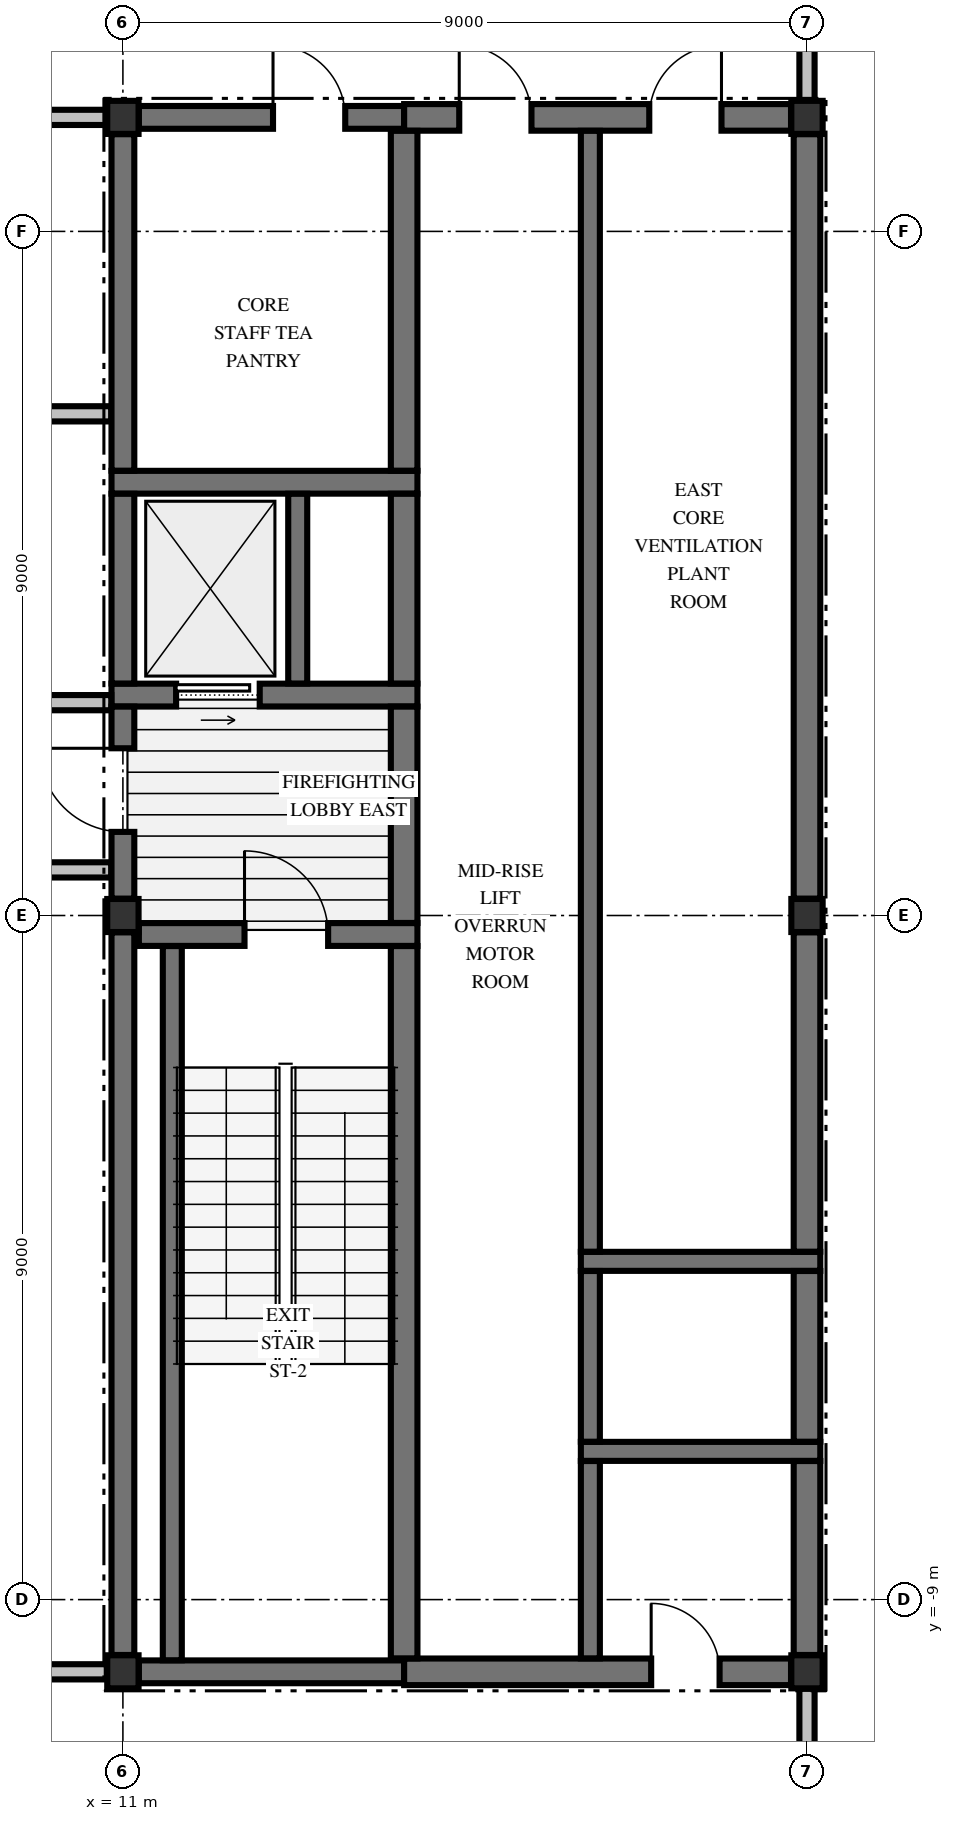
"""IFC4 building model, lengths in metres.
Left out: names, types, materials, properties, quantities, classifications, styles, units other than length and angle.
Written with IfcOpenShell. Run it as: python <this file> out.ifc"""

import sys

from ifc_helpers import new_model, si_unit, direction, frame, frame_2d, origin, origin_2d, place, context, subcontext, project, spatial, rectangle, i_section, extrude, element, fill, save


model = new_model("IFC4")
c1 = context("Model", 3, precision=1e-05, world=origin(), true_north=direction((0.0, 1.0)))
c2 = subcontext(c1, "Body", "Model", "MODEL_VIEW")
j1 = project(units=[si_unit("LENGTHUNIT", "METRE"), si_unit("PLANEANGLEUNIT", "RADIAN")], contexts=[c1])
p1 = place(None, origin())
s1 = spatial("IfcSite", under=j1, at=p1, CompositionType="ELEMENT")
p2 = place(p1, origin())
s2 = spatial("IfcBuilding", under=s1, at=p2, CompositionType="ELEMENT")
p3 = place(p2, frame((0.0, 0.0, 153.48)))
s3 = spatial("IfcBuildingStorey", under=s2, at=p3, CompositionType="ELEMENT", Elevation=153.48)
for number, where, z_axis, x_axis in (
    (1, (11.0, -9.95, -0.425), (0.0, 0.0, 1.0), (1.0, 0.0, 0.0)),
    (2, (11.0, 0.0, -0.425), (0.0, 0.0, 1.0), (1.0, 0.0, 0.0)),
    (3, (11.0, 10.5, -0.425), (0.0, 0.0, 1.0), (1.0, 0.0, 0.0)),
    (4, (20.0, -9.95, -0.425), (0.0, 0.0, 1.0), (1.0, 0.0, 0.0)),
    (5, (20.0, 10.5, -0.425), (0.0, 0.0, 1.0), (1.0, 0.0, 0.0)),
    (6, (20.0, 0.0, -0.425), (0.0, 0.0, 1.0), (1.0, 0.0, 0.0)),
):
    element("IfcColumn", number, at=place(p3, frame(where, z_axis=z_axis, x_axis=x_axis)), inside=s3, PredefinedType="COLUMN", context=c2, shape_type="SweptSolid", body=[
        extrude(i_section(OverallWidth=0.412, OverallDepth=0.435, WebThickness=0.036, FlangeThickness=0.058, FilletRadius=0.015, at=origin_2d()), origin(), (0.0, 0.0, 1.0), 4.76),
    ])
p4 = place(p3, frame((11.21, -9.95, 0.0), z_axis=(0.0, 0.0, 1.0), x_axis=(1.0, 0.0, 0.0)))
e7 = element("IfcWall", 7, at=p4, inside=s3, PredefinedType="SHEAR", context=c2, shape_type="SweptSolid", body=[
    extrude(rectangle(XDim=3.49, YDim=0.3, at=frame_2d((1.745, 0.0))), origin(), (0.0, 0.0, 1.0), 4.335),
])
p5 = place(p3, frame((14.7, -9.95, 0.0), z_axis=(0.0, 0.0, 1.0), x_axis=(1.0, 0.0, 0.0)))
e8 = element("IfcWall", 8, at=p5, inside=s3, PredefinedType="SHEAR", context=c2, shape_type="SweptSolid", body=[
    extrude(rectangle(XDim=5.09, YDim=0.35, at=frame_2d((2.545, 0.0))), origin(), (0.0, 0.0, 1.0), 4.335),
])
p6 = place(p5, frame((3.25, 0.0, 0.0)))
e9 = element("IfcOpeningElement", 9, at=p6, cuts=e8, PredefinedType="OPENING", context=c2, shape_type="SweptSolid", body=[
    extrude(rectangle(XDim=0.9, YDim=2.15, at=frame_2d((0.45, 1.075))), frame((0.0, 0.185, 0.0), z_axis=(0.0, -1.0, 0.0), x_axis=(1.0, 0.0, 0.0)), (0.0, 0.0, 1.0), 0.37),
])
for number, where, z_axis, x_axis in (
    (10, (17.025, -7.05, 0.0), (0.0, 0.0, 1.0), (1.0, 0.0, 0.0)),
    (11, (17.025, -4.55, 0.0), (0.0, 0.0, 1.0), (1.0, 0.0, 0.0)),
):
    element("IfcWall", number, at=place(p3, frame(where, z_axis=z_axis, x_axis=x_axis)), inside=s3, PredefinedType="SOLIDWALL", context=c2, shape_type="SweptSolid", body=[
        extrude(rectangle(XDim=3.15, YDim=0.25, at=frame_2d((1.575, 0.0))), origin(), (0.0, 0.0, 1.0), 4.335),
    ])
p7 = place(p3, frame((11.21, -0.25, 0.0), z_axis=(0.0, 0.0, 1.0), x_axis=(1.0, 0.0, 0.0)))
e12 = element("IfcWall", 12, at=p7, inside=s3, PredefinedType="SHEAR", context=c2, shape_type="SweptSolid", body=[
    extrude(rectangle(XDim=3.665, YDim=0.3, at=frame_2d((1.833, 0.0))), origin(), (0.0, 0.0, 1.0), 4.335),
])
p8 = place(p7, frame((1.39, 0.0, 0.0)))
e13 = element("IfcOpeningElement", 13, at=p8, cuts=e12, PredefinedType="OPENING", context=c2, shape_type="SweptSolid", body=[
    extrude(rectangle(XDim=1.1, YDim=2.15, at=frame_2d((0.55, 1.075))), frame((0.0, 0.16, 0.0), z_axis=(0.0, -1.0, 0.0), x_axis=(1.0, 0.0, 0.0)), (0.0, 0.0, 1.0), 0.32),
])
p9 = place(p3, frame((10.85, 2.9, 0.0), z_axis=(0.0, 0.0, 1.0), x_axis=(1.0, 0.0, 0.0)))
e14 = element("IfcWall", 14, at=p9, inside=s3, PredefinedType="SHEAR", context=c2, shape_type="SweptSolid", body=[
    extrude(rectangle(XDim=4.025, YDim=0.3, at=frame_2d((2.012, 0.0))), origin(), (0.0, 0.0, 1.0), 4.335),
])
p10 = place(p9, frame((0.85, 0.0, 0.0)))
e15 = element("IfcOpeningElement", 15, at=p10, cuts=e14, PredefinedType="OPENING", context=c2, shape_type="SweptSolid", body=[
    extrude(rectangle(XDim=1.1, YDim=2.2, at=frame_2d((0.55, 1.1))), frame((0.0, 0.16, 0.0), z_axis=(0.0, -1.0, 0.0), x_axis=(1.0, 0.0, 0.0)), (0.0, 0.0, 1.0), 0.32),
])
p11 = place(p3, frame((10.85, 5.7, 0.0), z_axis=(0.0, 0.0, 1.0), x_axis=(1.0, 0.0, 0.0)))
e16 = element("IfcWall", 16, at=p11, inside=s3, PredefinedType="SHEAR", context=c2, shape_type="SweptSolid", body=[
    extrude(rectangle(XDim=4.025, YDim=0.3, at=frame_2d((2.012, 0.0))), origin(), (0.0, 0.0, 1.0), 4.335),
])
p12 = place(p3, frame((11.21, 10.5, 0.0), z_axis=(0.0, 0.0, 1.0), x_axis=(1.0, 0.0, 0.0)))
e17 = element("IfcWall", 17, at=p12, inside=s3, PredefinedType="SHEAR", context=c2, shape_type="SweptSolid", body=[
    extrude(rectangle(XDim=3.49, YDim=0.3, at=frame_2d((1.745, 0.0))), origin(), (0.0, 0.0, 1.0), 4.335),
])
p13 = place(p12, frame((1.765, 0.0, 0.0)))
e18 = element("IfcOpeningElement", 18, at=p13, cuts=e17, PredefinedType="OPENING", context=c2, shape_type="SweptSolid", body=[
    extrude(rectangle(XDim=0.95, YDim=2.02, at=frame_2d((0.475, 1.01))), frame((0.0, 0.16, 0.0), z_axis=(0.0, -1.0, 0.0), x_axis=(1.0, 0.0, 0.0)), (0.0, 0.0, 1.0), 0.32),
])
p14 = place(p3, frame((14.7, 10.5, 0.0), z_axis=(0.0, 0.0, 1.0), x_axis=(1.0, 0.0, 0.0)))
e19 = element("IfcWall", 19, at=p14, inside=s3, PredefinedType="SHEAR", context=c2, shape_type="SweptSolid", body=[
    extrude(rectangle(XDim=5.09, YDim=0.35, at=frame_2d((2.545, 0.0))), origin(), (0.0, 0.0, 1.0), 4.335),
])
p15 = place(p14, frame((0.725, 0.0, 0.0)))
e20 = element("IfcOpeningElement", 20, at=p15, cuts=e19, PredefinedType="OPENING", context=c2, shape_type="SweptSolid", body=[
    extrude(rectangle(XDim=0.95, YDim=2.02, at=frame_2d((0.475, 1.01))), frame((0.0, 0.185, 0.0), z_axis=(0.0, -1.0, 0.0), x_axis=(1.0, 0.0, 0.0)), (0.0, 0.0, 1.0), 0.37),
])
p16 = place(p14, frame((3.225, 0.0, 0.0)))
e21 = element("IfcOpeningElement", 21, at=p16, cuts=e19, PredefinedType="OPENING", context=c2, shape_type="SweptSolid", body=[
    extrude(rectangle(XDim=0.95, YDim=2.02, at=frame_2d((0.475, 1.01))), frame((0.0, 0.185, 0.0), z_axis=(0.0, -1.0, 0.0), x_axis=(1.0, 0.0, 0.0)), (0.0, 0.0, 1.0), 0.37),
])
p17 = place(p3, frame((-10.788, -9.95, 0.0), z_axis=(0.0, 0.0, 1.0), x_axis=(1.0, 0.0, 0.0)))
e22 = element("IfcWall", 22, at=p17, inside=s3, PredefinedType="PARTITIONING", context=c2, shape_type="SweptSolid", body=[
    extrude(rectangle(XDim=21.576, YDim=0.2, at=frame_2d((10.788, 0.0))), origin(), (0.0, 0.0, 1.0), 4.335),
])
p18 = place(p17, frame((7.238, 0.0, 0.0)))
e23 = element("IfcOpeningElement", 23, at=p18, cuts=e22, PredefinedType="OPENING", context=c2, shape_type="SweptSolid", body=[
    extrude(rectangle(XDim=1.1, YDim=2.15, at=frame_2d((0.55, 1.075))), frame((0.0, 0.11, 0.0), z_axis=(0.0, -1.0, 0.0), x_axis=(1.0, 0.0, 0.0)), (0.0, 0.0, 1.0), 0.22),
])
p19 = place(p3, frame((-10.847, 0.6, 0.0), z_axis=(0.0, 0.0, 1.0), x_axis=(1.0, 0.0, 0.0)))
e24 = element("IfcWall", 24, at=p19, inside=s3, PredefinedType="PARTITIONING", context=c2, shape_type="SweptSolid", body=[
    extrude(rectangle(XDim=21.694, YDim=0.2, at=frame_2d((10.847, 0.0))), origin(), (0.0, 0.0, 1.0), 4.335),
])
p20 = place(p19, frame((7.297, 0.0, 0.0)))
e25 = element("IfcOpeningElement", 25, at=p20, cuts=e24, PredefinedType="OPENING", context=c2, shape_type="SweptSolid", body=[
    extrude(rectangle(XDim=1.1, YDim=2.15, at=frame_2d((0.55, 1.075))), frame((0.0, 0.11, 0.0), z_axis=(0.0, -1.0, 0.0), x_axis=(1.0, 0.0, 0.0)), (0.0, 0.0, 1.0), 0.22),
])
p21 = place(p19, frame((2.647, 0.0, 0.0)))
e26 = element("IfcOpeningElement", 26, at=p21, cuts=e24, PredefinedType="OPENING", context=c2, shape_type="SweptSolid", body=[
    extrude(rectangle(XDim=1.2, YDim=2.15, at=frame_2d((0.6, 1.075))), frame((0.0, 0.11, 0.0), z_axis=(0.0, -1.0, 0.0), x_axis=(1.0, 0.0, 0.0)), (0.0, 0.0, 1.0), 0.22),
])
p22 = place(p19, frame((14.847, 0.0, 0.0)))
e27 = element("IfcOpeningElement", 27, at=p22, cuts=e24, PredefinedType="OPENING", context=c2, shape_type="SweptSolid", body=[
    extrude(rectangle(XDim=1.2, YDim=2.15, at=frame_2d((0.6, 1.075))), frame((0.0, 0.11, 0.0), z_axis=(0.0, -1.0, 0.0), x_axis=(1.0, 0.0, 0.0)), (0.0, 0.0, 1.0), 0.22),
])
p23 = place(p3, frame((-10.847, 2.8, 0.0), z_axis=(0.0, 0.0, 1.0), x_axis=(1.0, 0.0, 0.0)))
e28 = element("IfcWall", 28, at=p23, inside=s3, PredefinedType="PARTITIONING", context=c2, shape_type="SweptSolid", body=[
    extrude(rectangle(XDim=21.694, YDim=0.2, at=frame_2d((10.847, 0.0))), origin(), (0.0, 0.0, 1.0), 4.335),
])
p24 = place(p23, frame((7.297, 0.0, 0.0)))
e29 = element("IfcOpeningElement", 29, at=p24, cuts=e28, PredefinedType="OPENING", context=c2, shape_type="SweptSolid", body=[
    extrude(rectangle(XDim=1.1, YDim=2.15, at=frame_2d((0.55, 1.075))), frame((0.0, 0.11, 0.0), z_axis=(0.0, -1.0, 0.0), x_axis=(1.0, 0.0, 0.0)), (0.0, 0.0, 1.0), 0.22),
])
p25 = place(p23, frame((17.497, 0.0, 0.0)))
e30 = element("IfcOpeningElement", 30, at=p25, cuts=e28, PredefinedType="OPENING", context=c2, shape_type="SweptSolid", body=[
    extrude(rectangle(XDim=1.1, YDim=2.15, at=frame_2d((0.55, 1.075))), frame((0.0, 0.11, 0.0), z_axis=(0.0, -1.0, 0.0), x_axis=(1.0, 0.0, 0.0)), (0.0, 0.0, 1.0), 0.22),
])
p26 = place(p3, frame((-1.9, 6.6, 0.0), z_axis=(0.0, 0.0, 1.0), x_axis=(1.0, 0.0, 0.0)))
e31 = element("IfcWall", 31, at=p26, inside=s3, PredefinedType="PARTITIONING", context=c2, shape_type="SweptSolid", body=[
    extrude(rectangle(XDim=12.747, YDim=0.2, at=frame_2d((6.374, 0.0))), origin(), (0.0, 0.0, 1.0), 4.335),
])
p27 = place(p3, frame((-10.788, 10.5, 0.0), z_axis=(0.0, 0.0, 1.0), x_axis=(1.0, 0.0, 0.0)))
e32 = element("IfcWall", 32, at=p27, inside=s3, PredefinedType="PARTITIONING", context=c2, shape_type="SweptSolid", body=[
    extrude(rectangle(XDim=21.576, YDim=0.2, at=frame_2d((10.788, 0.0))), origin(), (0.0, 0.0, 1.0), 4.335),
])
p28 = place(p27, frame((7.238, 0.0, 0.0)))
e33 = element("IfcOpeningElement", 33, at=p28, cuts=e32, PredefinedType="OPENING", context=c2, shape_type="SweptSolid", body=[
    extrude(rectangle(XDim=1.1, YDim=2.15, at=frame_2d((0.55, 1.075))), frame((0.0, 0.11, 0.0), z_axis=(0.0, -1.0, 0.0), x_axis=(1.0, 0.0, 0.0)), (0.0, 0.0, 1.0), 0.22),
])
p29 = place(p3, frame((11.0, -9.729, 0.0), z_axis=(0.0, 0.0, 1.0), x_axis=(0.0, 1.0, 0.0)))
e34 = element("IfcWall", 34, at=p29, inside=s3, PredefinedType="SHEAR", context=c2, shape_type="SweptSolid", body=[
    extrude(rectangle(XDim=9.507, YDim=0.3, at=frame_2d((4.753, 0.0))), origin(), (0.0, 0.0, 1.0), 4.335),
])
p30 = place(p3, frame((11.0, 0.221, 0.0), z_axis=(0.0, 0.0, 1.0), x_axis=(0.0, 1.0, 0.0)))
e35 = element("IfcWall", 35, at=p30, inside=s3, PredefinedType="SHEAR", context=c2, shape_type="SweptSolid", body=[
    extrude(rectangle(XDim=2.527, YDim=0.3, at=frame_2d((1.263, 0.0))), origin(), (0.0, 0.0, 1.0), 4.335),
])
p31 = place(p30, frame((0.878, 0.0, 0.0)))
e36 = element("IfcOpeningElement", 36, at=p31, cuts=e35, PredefinedType="OPENING", context=c2, shape_type="SweptSolid", body=[
    extrude(rectangle(XDim=1.1, YDim=2.15, at=frame_2d((0.55, 1.075))), frame((0.0, 0.16, 0.0), z_axis=(0.0, -1.0, 0.0), x_axis=(1.0, 0.0, 0.0)), (0.0, 0.0, 1.0), 0.32),
])
p32 = place(p3, frame((11.0, 3.052, 0.0), z_axis=(0.0, 0.0, 1.0), x_axis=(0.0, 1.0, 0.0)))
e37 = element("IfcWall", 37, at=p32, inside=s3, PredefinedType="SHEAR", context=c2, shape_type="SweptSolid", body=[
    extrude(rectangle(XDim=2.496, YDim=0.3, at=frame_2d((1.248, 0.0))), origin(), (0.0, 0.0, 1.0), 4.335),
])
p33 = place(p3, frame((11.0, 5.852, 0.0), z_axis=(0.0, 0.0, 1.0), x_axis=(0.0, 1.0, 0.0)))
e38 = element("IfcWall", 38, at=p33, inside=s3, PredefinedType="SHEAR", context=c2, shape_type="SweptSolid", body=[
    extrude(rectangle(XDim=4.427, YDim=0.3, at=frame_2d((2.213, 0.0))), origin(), (0.0, 0.0, 1.0), 4.335),
])
p34 = place(p3, frame((11.65, -9.798, 0.0), z_axis=(0.0, 0.0, 1.0), x_axis=(0.0, 1.0, 0.0)))
e39 = element("IfcWall", 39, at=p34, inside=s3, PredefinedType="SOLIDWALL", context=c2, shape_type="SweptSolid", body=[
    extrude(rectangle(XDim=9.396, YDim=0.25, at=frame_2d((4.698, 0.0))), origin(), (0.0, 0.0, 1.0), 4.335),
])
p35 = place(p3, frame((13.3, 3.052, 0.0), z_axis=(0.0, 0.0, 1.0), x_axis=(0.0, 1.0, 0.0)))
e40 = element("IfcWall", 40, at=p35, inside=s3, PredefinedType="SOLIDWALL", context=c2, shape_type="SweptSolid", body=[
    extrude(rectangle(XDim=2.496, YDim=0.25, at=frame_2d((1.248, 0.0))), origin(), (0.0, 0.0, 1.0), 4.335),
])
p36 = place(p3, frame((14.7, -9.773, 0.0), z_axis=(0.0, 0.0, 1.0), x_axis=(0.0, 1.0, 0.0)))
e41 = element("IfcWall", 41, at=p36, inside=s3, PredefinedType="SHEAR", context=c2, shape_type="SweptSolid", body=[
    extrude(rectangle(XDim=9.371, YDim=0.35, at=frame_2d((4.686, 0.0))), origin(), (0.0, 0.0, 1.0), 4.335),
])
p37 = place(p3, frame((14.7, -0.098, 0.0), z_axis=(0.0, 0.0, 1.0), x_axis=(0.0, 1.0, 0.0)))
e42 = element("IfcWall", 42, at=p37, inside=s3, PredefinedType="SHEAR", context=c2, shape_type="SweptSolid", body=[
    extrude(rectangle(XDim=2.846, YDim=0.35, at=frame_2d((1.423, 0.0))), origin(), (0.0, 0.0, 1.0), 4.335),
])
p38 = place(p3, frame((14.7, 3.052, 0.0), z_axis=(0.0, 0.0, 1.0), x_axis=(0.0, 1.0, 0.0)))
e43 = element("IfcWall", 43, at=p38, inside=s3, PredefinedType="SHEAR", context=c2, shape_type="SweptSolid", body=[
    extrude(rectangle(XDim=2.496, YDim=0.35, at=frame_2d((1.248, 0.0))), origin(), (0.0, 0.0, 1.0), 4.335),
])
p39 = place(p3, frame((14.7, 5.852, 0.0), z_axis=(0.0, 0.0, 1.0), x_axis=(0.0, 1.0, 0.0)))
e44 = element("IfcWall", 44, at=p39, inside=s3, PredefinedType="SHEAR", context=c2, shape_type="SweptSolid", body=[
    extrude(rectangle(XDim=4.471, YDim=0.35, at=frame_2d((2.235, 0.0))), origin(), (0.0, 0.0, 1.0), 4.335),
])
p40 = place(p3, frame((17.15, -9.773, 0.0), z_axis=(0.0, 0.0, 1.0), x_axis=(0.0, 1.0, 0.0)))
e45 = element("IfcWall", 45, at=p40, inside=s3, PredefinedType="SOLIDWALL", context=c2, shape_type="SweptSolid", body=[
    extrude(rectangle(XDim=2.596, YDim=0.25, at=frame_2d((1.298, 0.0))), origin(), (0.0, 0.0, 1.0), 4.335),
])
p41 = place(p3, frame((17.15, -6.923, 0.0), z_axis=(0.0, 0.0, 1.0), x_axis=(0.0, 1.0, 0.0)))
e46 = element("IfcWall", 46, at=p41, inside=s3, PredefinedType="SOLIDWALL", context=c2, shape_type="SweptSolid", body=[
    extrude(rectangle(XDim=2.246, YDim=0.25, at=frame_2d((1.123, 0.0))), origin(), (0.0, 0.0, 1.0), 4.335),
])
p42 = place(p3, frame((17.15, -4.423, 0.0), z_axis=(0.0, 0.0, 1.0), x_axis=(0.0, 1.0, 0.0)))
e47 = element("IfcWall", 47, at=p42, inside=s3, PredefinedType="SOLIDWALL", context=c2, shape_type="SweptSolid", body=[
    extrude(rectangle(XDim=14.746, YDim=0.25, at=frame_2d((7.373, 0.0))), origin(), (0.0, 0.0, 1.0), 4.335),
])
p43 = place(p3, frame((20.0, -9.729, 0.0), z_axis=(0.0, 0.0, 1.0), x_axis=(0.0, 1.0, 0.0)))
e48 = element("IfcWall", 48, at=p43, inside=s3, PredefinedType="SHEAR", context=c2, shape_type="SweptSolid", body=[
    extrude(rectangle(XDim=2.552, YDim=0.35, at=frame_2d((1.276, 0.0))), origin(), (0.0, 0.0, 1.0), 4.335),
])
p44 = place(p3, frame((20.0, -6.923, 0.0), z_axis=(0.0, 0.0, 1.0), x_axis=(0.0, 1.0, 0.0)))
e49 = element("IfcWall", 49, at=p44, inside=s3, PredefinedType="SHEAR", context=c2, shape_type="SweptSolid", body=[
    extrude(rectangle(XDim=2.246, YDim=0.35, at=frame_2d((1.123, 0.0))), origin(), (0.0, 0.0, 1.0), 4.335),
])
p45 = place(p3, frame((20.0, -4.423, 0.0), z_axis=(0.0, 0.0, 1.0), x_axis=(0.0, 1.0, 0.0)))
e50 = element("IfcWall", 50, at=p45, inside=s3, PredefinedType="SHEAR", context=c2, shape_type="SweptSolid", body=[
    extrude(rectangle(XDim=4.202, YDim=0.35, at=frame_2d((2.101, 0.0))), origin(), (0.0, 0.0, 1.0), 4.335),
])
p46 = place(p3, frame((20.0, 0.221, 0.0), z_axis=(0.0, 0.0, 1.0), x_axis=(0.0, 1.0, 0.0)))
e51 = element("IfcWall", 51, at=p46, inside=s3, PredefinedType="SHEAR", context=c2, shape_type="SweptSolid", body=[
    extrude(rectangle(XDim=10.057, YDim=0.35, at=frame_2d((5.029, 0.0))), origin(), (0.0, 0.0, 1.0), 4.335),
])
p47 = place(p3, frame((20.0, -12.697, 0.0), z_axis=(0.0, 0.0, 1.0), x_axis=(0.0, 1.0, 0.0)))
e52 = element("IfcWall", 52, at=p47, inside=s3, PredefinedType="PARTITIONING", context=c2, shape_type="SweptSolid", body=[
    extrude(rectangle(XDim=2.523, YDim=0.2, at=frame_2d((1.262, 0.0))), origin(), (0.0, 0.0, 1.0), 1.927),
])
p48 = place(p3, frame((20.0, 10.723, 0.0), z_axis=(0.0, 0.0, 1.0), x_axis=(0.0, 1.0, 0.0)))
e53 = element("IfcWall", 53, at=p48, inside=s3, PredefinedType="PARTITIONING", context=c2, shape_type="SweptSolid", body=[
    extrude(rectangle(XDim=1.974, YDim=0.2, at=frame_2d((0.987, 0.0))), origin(), (0.0, 0.0, 1.0), 2.127),
])
p49 = place(p8, origin())
e54 = element("IfcDoor", 54, at=p49, inside=s3, OperationType="SINGLE_SWING_LEFT", PredefinedType="DOOR", context=c2, shape_type="SweptSolid", body=[
    extrude(rectangle(XDim=1.1, YDim=2.15, at=frame_2d((0.55, 1.075))), frame((0.0, 0.025, 0.0), z_axis=(0.0, -1.0, 0.0), x_axis=(1.0, 0.0, 0.0)), (0.0, 0.0, 1.0), 0.05),
])
fill(e13, e54)
p50 = place(p31, origin())
e55 = element("IfcDoor", 55, at=p50, inside=s3, OperationType="SINGLE_SWING_RIGHT", PredefinedType="DOOR", context=c2, shape_type="SweptSolid", body=[
    extrude(rectangle(XDim=1.1, YDim=2.15, at=frame_2d((0.55, 1.075))), frame((0.0, 0.025, 0.0), z_axis=(0.0, -1.0, 0.0), x_axis=(1.0, 0.0, 0.0)), (0.0, 0.0, 1.0), 0.05),
])
fill(e36, e55)
p51 = place(p10, origin())
e56 = element("IfcDoor", 56, at=p51, inside=s3, OperationType="SLIDING_TO_RIGHT", PredefinedType="DOOR", context=c2, shape_type="SweptSolid", body=[
    extrude(rectangle(XDim=1.1, YDim=2.2, at=frame_2d((0.55, 1.1))), frame((0.0, 0.025, 0.0), z_axis=(0.0, -1.0, 0.0), x_axis=(1.0, 0.0, 0.0)), (0.0, 0.0, 1.0), 0.05),
])
fill(e15, e56)
p52 = place(p13, origin())
e57 = element("IfcDoor", 57, at=p52, inside=s3, OperationType="SINGLE_SWING_LEFT", PredefinedType="DOOR", context=c2, shape_type="SweptSolid", body=[
    extrude(rectangle(XDim=0.95, YDim=2.02, at=frame_2d((0.475, 1.01))), frame((0.0, 0.025, 0.0), z_axis=(0.0, -1.0, 0.0), x_axis=(1.0, 0.0, 0.0)), (0.0, 0.0, 1.0), 0.05),
])
fill(e18, e57)
p53 = place(p15, origin())
e58 = element("IfcDoor", 58, at=p53, inside=s3, OperationType="SINGLE_SWING_LEFT", PredefinedType="DOOR", context=c2, shape_type="SweptSolid", body=[
    extrude(rectangle(XDim=0.95, YDim=2.02, at=frame_2d((0.475, 1.01))), frame((0.0, 0.025, 0.0), z_axis=(0.0, -1.0, 0.0), x_axis=(1.0, 0.0, 0.0)), (0.0, 0.0, 1.0), 0.05),
])
fill(e20, e58)
p54 = place(p16, origin())
e59 = element("IfcDoor", 59, at=p54, inside=s3, OperationType="SINGLE_SWING_RIGHT", PredefinedType="DOOR", context=c2, shape_type="SweptSolid", body=[
    extrude(rectangle(XDim=0.95, YDim=2.02, at=frame_2d((0.475, 1.01))), frame((0.0, 0.025, 0.0), z_axis=(0.0, -1.0, 0.0), x_axis=(1.0, 0.0, 0.0)), (0.0, 0.0, 1.0), 0.05),
])
fill(e21, e59)
p55 = place(p6, origin())
e60 = element("IfcDoor", 60, at=p55, inside=s3, OperationType="SINGLE_SWING_LEFT", PredefinedType="DOOR", context=c2, shape_type="SweptSolid", body=[
    extrude(rectangle(XDim=0.9, YDim=2.15, at=frame_2d((0.45, 1.075))), frame((0.0, 0.025, 0.0), z_axis=(0.0, -1.0, 0.0), x_axis=(1.0, 0.0, 0.0)), (0.0, 0.0, 1.0), 0.05),
])
fill(e9, e60)
save(model, sys.argv[1])
